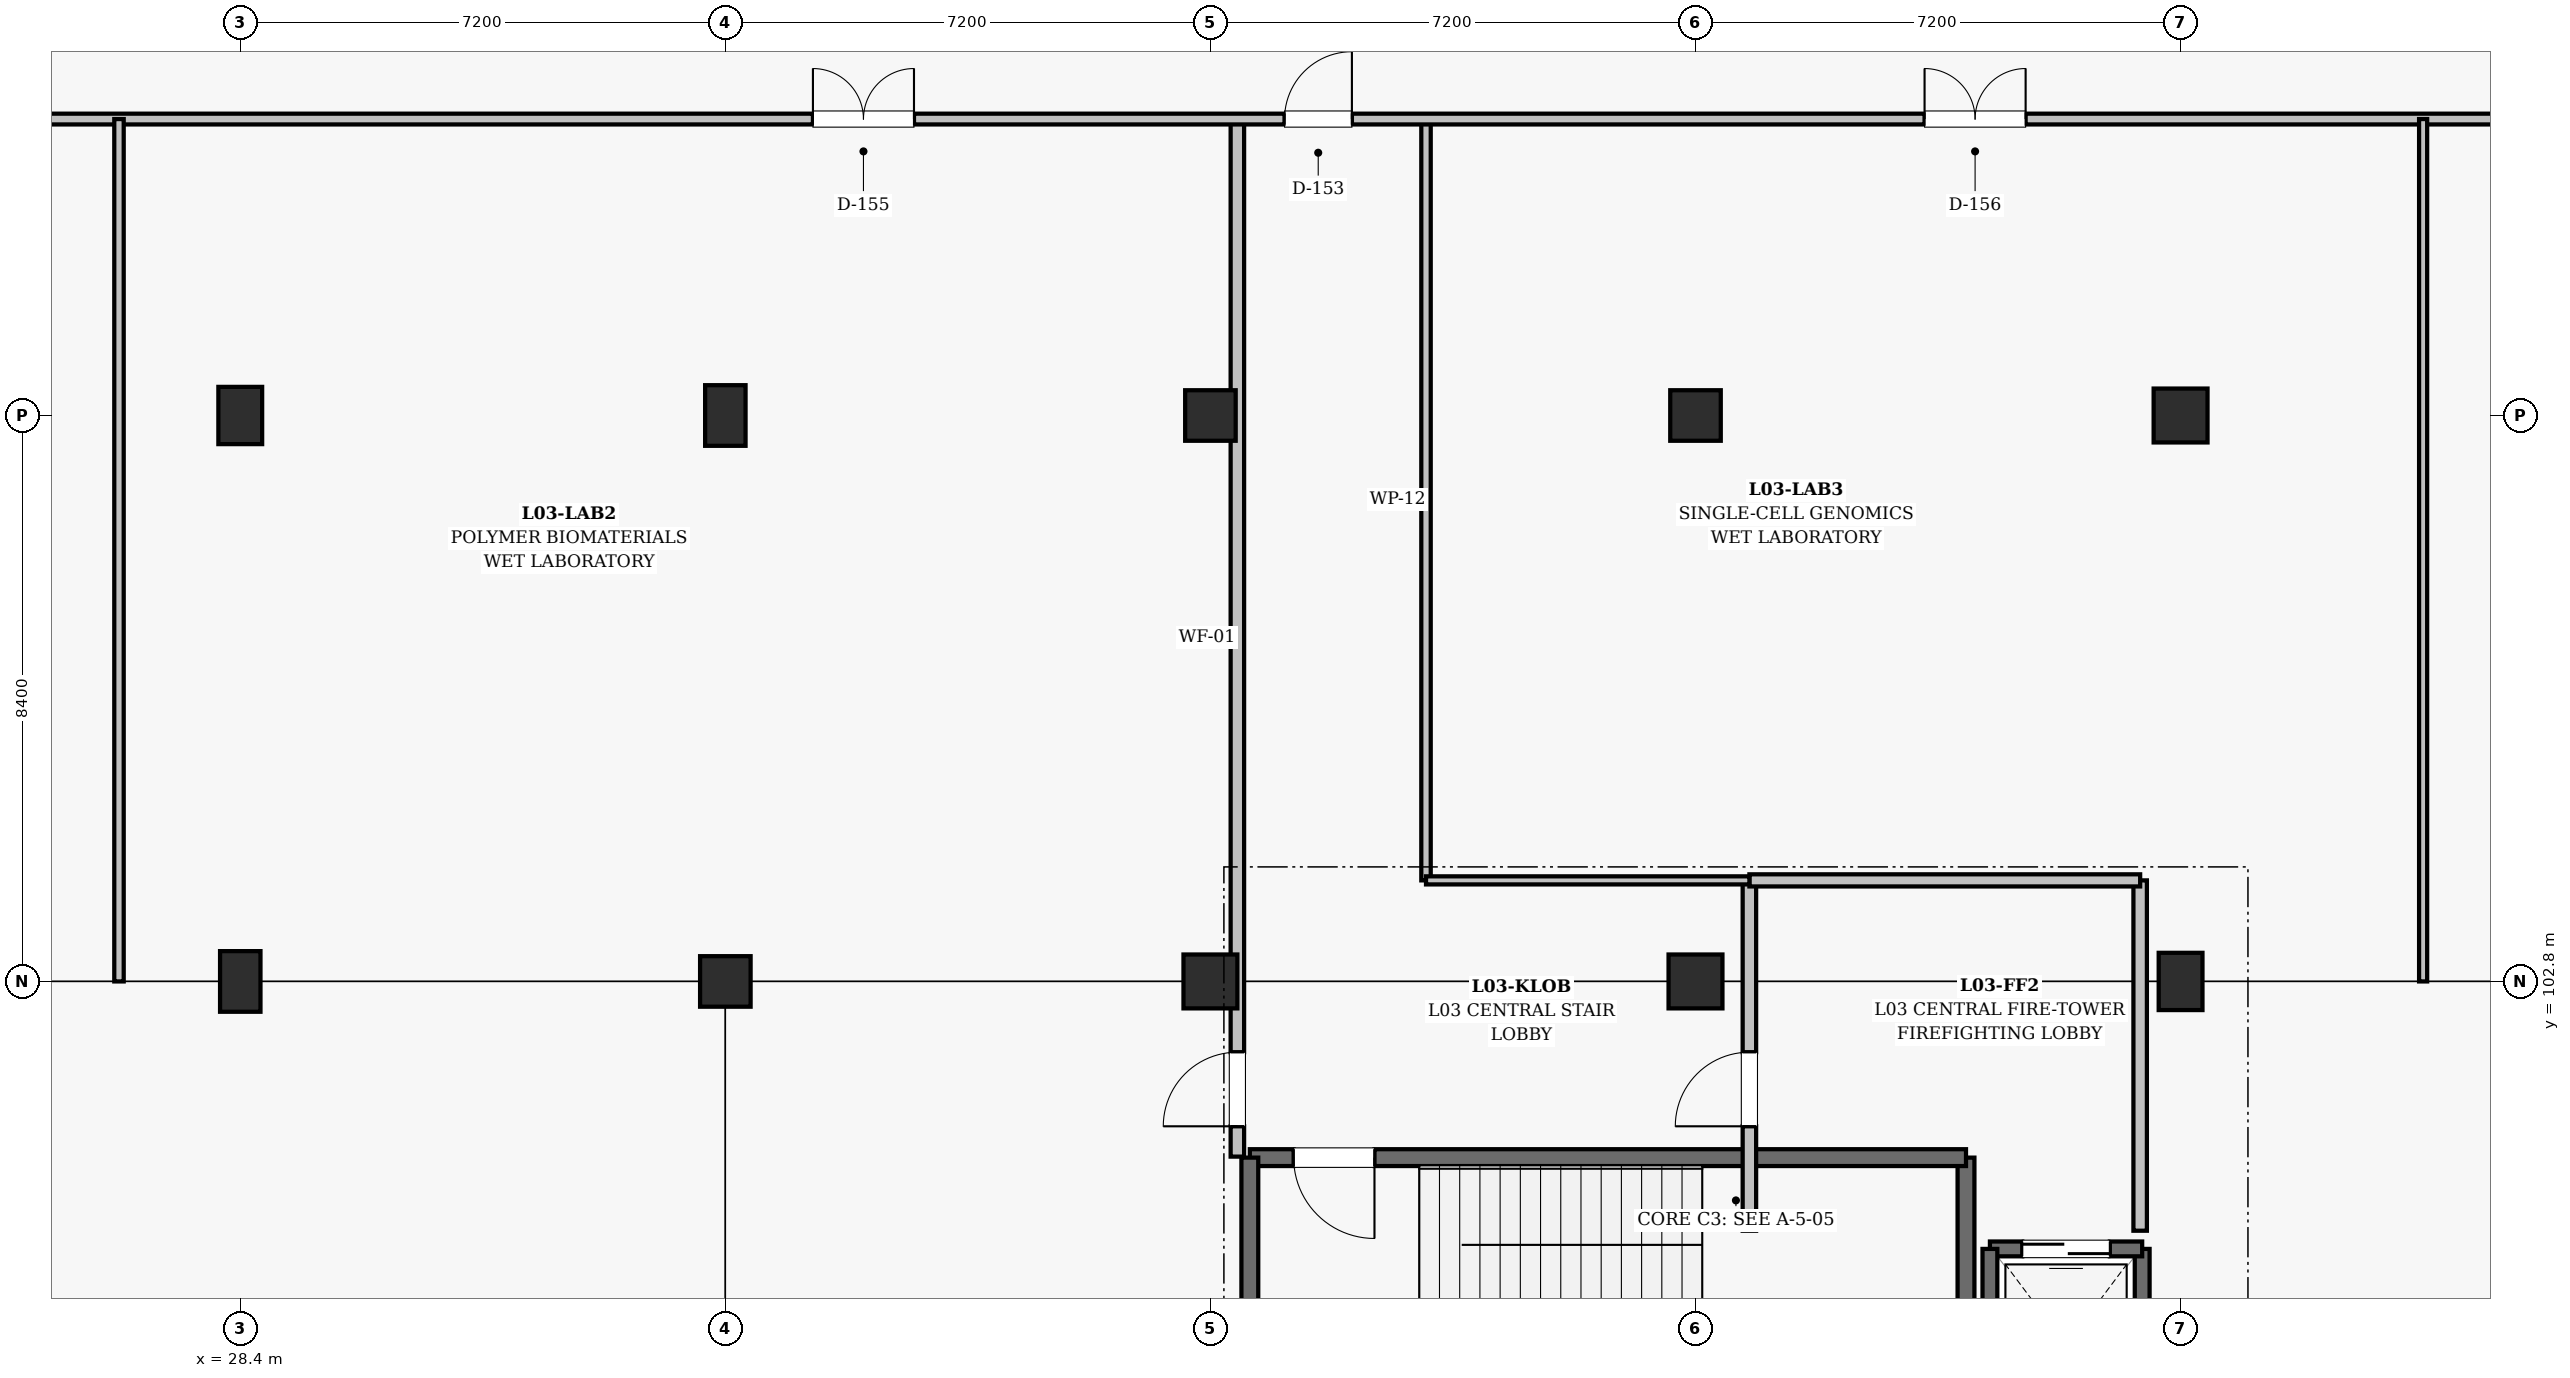
"""IFC4 building model, lengths in metres.
Left out: names, types, materials, properties, quantities, classifications, styles, units other than length and angle.
Written with IfcOpenShell. Run it as: python <this file> out.ifc"""

import sys

from ifc_helpers import new_model, si_unit, direction, frame, frame_2d, origin, origin_2d, place, context, subcontext, project, spatial, rectangle, extrude, element, fill, save


model = new_model("IFC4")
c1 = context("Model", 3, precision=1e-05, world=origin(), true_north=direction((0.0, 1.0)))
c2 = subcontext(c1, "Body", "Model", "MODEL_VIEW")
j1 = project(units=[si_unit("LENGTHUNIT", "METRE"), si_unit("PLANEANGLEUNIT", "RADIAN")], contexts=[c1])
p1 = place(None, origin())
s1 = spatial("IfcSite", under=j1, at=p1, CompositionType="ELEMENT")
p2 = place(p1, origin())
s2 = spatial("IfcBuilding", under=s1, at=p2, CompositionType="ELEMENT")
p3 = place(p2, frame((0.0, 0.0, 14.4)))
s3 = spatial("IfcBuildingStorey", under=s2, at=p3, CompositionType="ELEMENT", Elevation=14.4)
p4 = place(p3, frame((28.4, 102.8, 0.0), z_axis=(0.0, 0.0, 1.0), x_axis=(1.0, 0.0, 0.0)))
e1 = element("IfcColumn", 1, at=p4, inside=s3, PredefinedType="COLUMN", context=c2, shape_type="SweptSolid", body=[
    extrude(rectangle(XDim=0.6, YDim=0.9, at=origin_2d()), origin(), (0.0, 0.0, 1.0), 4.5),
])
p5 = place(p3, frame((28.4, 111.2, 0.0), z_axis=(0.0, 0.0, 1.0), x_axis=(1.0, 0.0, 0.0)))
e2 = element("IfcColumn", 2, at=p5, inside=s3, PredefinedType="COLUMN", context=c2, shape_type="SweptSolid", body=[
    extrude(rectangle(XDim=0.65, YDim=0.85, at=origin_2d()), origin(), (0.0, 0.0, 1.0), 4.5),
])
p6 = place(p3, frame((35.6, 102.8, 0.0), z_axis=(0.0, 0.0, 1.0), x_axis=(1.0, 0.0, 0.0)))
e3 = element("IfcColumn", 3, at=p6, inside=s3, PredefinedType="COLUMN", context=c2, shape_type="SweptSolid", body=[
    extrude(rectangle(XDim=0.75, YDim=0.75, at=origin_2d()), origin(), (0.0, 0.0, 1.0), 4.5),
])
p7 = place(p3, frame((35.6, 111.2, 0.0), z_axis=(0.0, 0.0, 1.0), x_axis=(1.0, 0.0, 0.0)))
e4 = element("IfcColumn", 4, at=p7, inside=s3, PredefinedType="COLUMN", context=c2, shape_type="SweptSolid", body=[
    extrude(rectangle(XDim=0.6, YDim=0.9, at=origin_2d()), origin(), (0.0, 0.0, 1.0), 4.5),
])
p8 = place(p3, frame((42.8, 102.8, 0.0), z_axis=(0.0, 0.0, 1.0), x_axis=(1.0, 0.0, 0.0)))
e5 = element("IfcColumn", 5, at=p8, inside=s3, PredefinedType="COLUMN", context=c2, shape_type="SweptSolid", body=[
    extrude(rectangle(XDim=0.8, YDim=0.8, at=origin_2d()), origin(), (0.0, 0.0, 1.0), 4.5),
])
p9 = place(p3, frame((42.8, 111.2, 0.0), z_axis=(0.0, 0.0, 1.0), x_axis=(1.0, 0.0, 0.0)))
e6 = element("IfcColumn", 6, at=p9, inside=s3, PredefinedType="COLUMN", context=c2, shape_type="SweptSolid", body=[
    extrude(rectangle(XDim=0.75, YDim=0.75, at=origin_2d()), origin(), (0.0, 0.0, 1.0), 4.5),
])
p10 = place(p3, frame((50.0, 102.8, 0.0), z_axis=(0.0, 0.0, 1.0), x_axis=(1.0, 0.0, 0.0)))
e7 = element("IfcColumn", 7, at=p10, inside=s3, PredefinedType="COLUMN", context=c2, shape_type="SweptSolid", body=[
    extrude(rectangle(XDim=0.8, YDim=0.8, at=origin_2d()), origin(), (0.0, 0.0, 1.0), 4.5),
])
p11 = place(p3, frame((50.0, 111.2, 0.0), z_axis=(0.0, 0.0, 1.0), x_axis=(1.0, 0.0, 0.0)))
e8 = element("IfcColumn", 8, at=p11, inside=s3, PredefinedType="COLUMN", context=c2, shape_type="SweptSolid", body=[
    extrude(rectangle(XDim=0.75, YDim=0.75, at=origin_2d()), origin(), (0.0, 0.0, 1.0), 4.5),
])
p12 = place(p3, frame((57.2, 102.8, 0.0), z_axis=(0.0, 0.0, 1.0), x_axis=(1.0, 0.0, 0.0)))
e9 = element("IfcColumn", 9, at=p12, inside=s3, PredefinedType="COLUMN", context=c2, shape_type="SweptSolid", body=[
    extrude(rectangle(XDim=0.65, YDim=0.85, at=origin_2d()), origin(), (0.0, 0.0, 1.0), 4.5),
])
p13 = place(p3, frame((57.2, 111.2, 0.0), z_axis=(0.0, 0.0, 1.0), x_axis=(1.0, 0.0, 0.0)))
e10 = element("IfcColumn", 10, at=p13, inside=s3, PredefinedType="COLUMN", context=c2, shape_type="SweptSolid", body=[
    extrude(rectangle(XDim=0.8, YDim=0.8, at=origin_2d()), origin(), (0.0, 0.0, 1.0), 4.5),
])
p14 = place(p3, frame((54.015, 95.085, 0.0), z_axis=(0.0, 0.0, 1.0), x_axis=(0.0, 1.0, 0.0)))
e11 = element("IfcWall", 11, at=p14, inside=s3, PredefinedType="SHEAR", context=c2, shape_type="SweptSolid", body=[
    extrude(rectangle(XDim=5.1, YDim=0.25, at=frame_2d((2.55, 0.0))), origin(), (0.0, 0.0, 1.0), 4.175),
])
p15 = place(p3, frame((54.015, 100.185, 0.0), z_axis=(0.0, 0.0, 1.0), x_axis=(-1.0, 0.0, 0.0)))
e12 = element("IfcWall", 12, at=p15, inside=s3, PredefinedType="SHEAR", context=c2, shape_type="SweptSolid", body=[
    extrude(rectangle(XDim=10.63, YDim=0.25, at=frame_2d((5.315, 0.0))), origin(), (0.0, 0.0, 1.0), 4.175),
])
p16 = place(p15, frame((8.78, 0.0, 0.0)))
e13 = element("IfcOpeningElement", 13, at=p16, cuts=e12, PredefinedType="OPENING", context=c2, shape_type="SweptSolid", body=[
    extrude(rectangle(XDim=1.2, YDim=2.15, at=frame_2d((0.6, 1.075))), frame((0.0, 0.135, 0.0), z_axis=(0.0, -1.0, 0.0), x_axis=(1.0, 0.0, 0.0)), (0.0, 0.0, 1.0), 0.27),
])
p17 = place(p3, frame((43.385, 100.185, 0.0), z_axis=(0.0, 0.0, 1.0), x_axis=(0.0, -1.0, 0.0)))
e14 = element("IfcWall", 14, at=p17, inside=s3, PredefinedType="SHEAR", context=c2, shape_type="SweptSolid", body=[
    extrude(rectangle(XDim=5.1, YDim=0.25, at=frame_2d((2.55, 0.0))), origin(), (0.0, 0.0, 1.0), 4.175),
])
p18 = place(p3, frame((56.63, 95.97, 0.0), z_axis=(0.0, 0.0, 1.0), x_axis=(0.0, 1.0, 0.0)))
e15 = element("IfcWall", 15, at=p18, inside=s3, PredefinedType="SHEAR", context=c2, shape_type="SweptSolid", body=[
    extrude(rectangle(XDim=2.86, YDim=0.22, at=frame_2d((1.43, 0.0))), origin(), (0.0, 0.0, 1.0), 4.175),
])
p19 = place(p3, frame((56.63, 98.83, 0.0), z_axis=(0.0, 0.0, 1.0), x_axis=(-1.0, 0.0, 0.0)))
e16 = element("IfcWall", 16, at=p19, inside=s3, PredefinedType="SHEAR", context=c2, shape_type="SweptSolid", body=[
    extrude(rectangle(XDim=2.26, YDim=0.22, at=frame_2d((1.13, 0.0))), origin(), (0.0, 0.0, 1.0), 4.175),
])
p20 = place(p19, frame((0.48, 0.0, 0.0)))
e17 = element("IfcOpeningElement", 17, at=p20, cuts=e16, PredefinedType="OPENING", context=c2, shape_type="SweptSolid", body=[
    extrude(rectangle(XDim=1.3, YDim=2.2, at=frame_2d((0.65, 1.1))), frame((0.0, 0.12, 0.0), z_axis=(0.0, -1.0, 0.0), x_axis=(1.0, 0.0, 0.0)), (0.0, 0.0, 1.0), 0.24),
])
p21 = place(p3, frame((54.37, 98.83, 0.0), z_axis=(0.0, 0.0, 1.0), x_axis=(0.0, -1.0, 0.0)))
e18 = element("IfcWall", 18, at=p21, inside=s3, PredefinedType="SHEAR", context=c2, shape_type="SweptSolid", body=[
    extrude(rectangle(XDim=2.86, YDim=0.22, at=frame_2d((1.43, 0.0))), origin(), (0.0, 0.0, 1.0), 4.175),
])
p22 = place(p3, frame((50.8, 99.1, 0.0), z_axis=(0.0, 0.0, 1.0), x_axis=(0.0, 1.0, 0.0)))
e19 = element("IfcWall", 19, at=p22, inside=s3, PredefinedType="SOLIDWALL", context=c2, shape_type="SweptSolid", body=[
    extrude(rectangle(XDim=5.2, YDim=0.2, at=frame_2d((2.6, 0.0))), origin(), (0.0, 0.0, 1.0), 3.36),
])
p23 = place(p22, frame((1.55, 0.0, 0.0)))
e20 = element("IfcOpeningElement", 20, at=p23, cuts=e19, PredefinedType="OPENING", context=c2, shape_type="SweptSolid", body=[
    extrude(rectangle(XDim=1.1, YDim=2.15, at=frame_2d((0.55, 1.075))), frame((0.0, 0.11, 0.0), z_axis=(0.0, -1.0, 0.0), x_axis=(1.0, 0.0, 0.0)), (0.0, 0.0, 1.0), 0.22),
])
p24 = place(p3, frame((56.6, 99.1, 0.0), z_axis=(0.0, 0.0, 1.0), x_axis=(0.0, 1.0, 0.0)))
e21 = element("IfcWall", 21, at=p24, inside=s3, PredefinedType="SOLIDWALL", context=c2, shape_type="SweptSolid", body=[
    extrude(rectangle(XDim=5.2, YDim=0.2, at=frame_2d((2.6, 0.0))), origin(), (0.0, 0.0, 1.0), 3.36),
])
p25 = place(p3, frame((50.8, 104.3, 0.0), z_axis=(0.0, 0.0, 1.0), x_axis=(1.0, 0.0, 0.0)))
e22 = element("IfcWall", 22, at=p25, inside=s3, PredefinedType="SOLIDWALL", context=c2, shape_type="SweptSolid", body=[
    extrude(rectangle(XDim=5.8, YDim=0.18, at=frame_2d((2.9, 0.0))), origin(), (0.0, 0.0, 1.0), 3.56),
])
p26 = place(p3, frame((43.2, 100.2, 0.0), z_axis=(0.0, 0.0, 1.0), x_axis=(0.0, 1.0, 0.0)))
e23 = element("IfcWall", 23, at=p26, inside=s3, PredefinedType="SOLIDWALL", context=c2, shape_type="SweptSolid", body=[
    extrude(rectangle(XDim=15.4, YDim=0.2, at=frame_2d((7.7, 0.0))), origin(), (0.0, 0.0, 1.0), 2.96),
])
p27 = place(p26, frame((0.45, 0.0, 0.0)))
e24 = element("IfcOpeningElement", 24, at=p27, cuts=e23, PredefinedType="OPENING", context=c2, shape_type="SweptSolid", body=[
    extrude(rectangle(XDim=1.1, YDim=2.15, at=frame_2d((0.55, 1.075))), frame((0.0, 0.11, 0.0), z_axis=(0.0, -1.0, 0.0), x_axis=(1.0, 0.0, 0.0)), (0.0, 0.0, 1.0), 0.22),
])
p28 = place(p3, frame((46.0, 104.3, 0.0), z_axis=(0.0, 0.0, 1.0), x_axis=(0.0, 1.0, 0.0)))
e25 = element("IfcWall", 25, at=p28, inside=s3, PredefinedType="PARTITIONING", context=c2, shape_type="SweptSolid", body=[
    extrude(rectangle(XDim=11.3, YDim=0.14, at=frame_2d((5.65, 0.0))), origin(), (0.0, 0.0, 1.0), 3.52),
])
p29 = place(p3, frame((46.0, 104.3, 0.0), z_axis=(0.0, 0.0, 1.0), x_axis=(1.0, 0.0, 0.0)))
e26 = element("IfcWall", 26, at=p29, inside=s3, PredefinedType="PARTITIONING", context=c2, shape_type="SweptSolid", body=[
    extrude(rectangle(XDim=4.8, YDim=0.12, at=frame_2d((2.4, 0.0))), origin(), (0.0, 0.0, 1.0), 3.31),
])
p30 = place(p3, frame((14.0, 115.6, 0.0), z_axis=(0.0, 0.0, 1.0), x_axis=(1.0, 0.0, 0.0)))
e27 = element("IfcWall", 27, at=p30, inside=s3, PredefinedType="PARTITIONING", context=c2, shape_type="SweptSolid", body=[
    extrude(rectangle(XDim=100.8, YDim=0.16, at=frame_2d((50.4, 0.0))), origin(), (0.0, 0.0, 1.0), 2.96),
])
p31 = place(p30, frame((29.9, 0.0, 0.0)))
e28 = element("IfcOpeningElement", 28, at=p31, cuts=e27, PredefinedType="OPENING", context=c2, shape_type="SweptSolid", body=[
    extrude(rectangle(XDim=1.0, YDim=2.15, at=frame_2d((0.5, 1.075))), frame((0.0, 0.09, 0.0), z_axis=(0.0, -1.0, 0.0), x_axis=(1.0, 0.0, 0.0)), (0.0, 0.0, 1.0), 0.18),
])
p32 = place(p30, frame((6.5, 0.0, 0.0)))
e29 = element("IfcOpeningElement", 29, at=p32, cuts=e27, PredefinedType="OPENING", context=c2, shape_type="SweptSolid", body=[
    extrude(rectangle(XDim=1.5, YDim=2.25, at=frame_2d((0.75, 1.125))), frame((0.0, 0.09, 0.0), z_axis=(0.0, -1.0, 0.0), x_axis=(1.0, 0.0, 0.0)), (0.0, 0.0, 1.0), 0.18),
])
p33 = place(p30, frame((22.9, 0.0, 0.0)))
e30 = element("IfcOpeningElement", 30, at=p33, cuts=e27, PredefinedType="OPENING", context=c2, shape_type="SweptSolid", body=[
    extrude(rectangle(XDim=1.5, YDim=2.25, at=frame_2d((0.75, 1.125))), frame((0.0, 0.09, 0.0), z_axis=(0.0, -1.0, 0.0), x_axis=(1.0, 0.0, 0.0)), (0.0, 0.0, 1.0), 0.18),
])
p34 = place(p30, frame((39.4, 0.0, 0.0)))
e31 = element("IfcOpeningElement", 31, at=p34, cuts=e27, PredefinedType="OPENING", context=c2, shape_type="SweptSolid", body=[
    extrude(rectangle(XDim=1.5, YDim=2.25, at=frame_2d((0.75, 1.125))), frame((0.0, 0.09, 0.0), z_axis=(0.0, -1.0, 0.0), x_axis=(1.0, 0.0, 0.0)), (0.0, 0.0, 1.0), 0.18),
])
p35 = place(p30, frame((55.8, 0.0, 0.0)))
e32 = element("IfcOpeningElement", 32, at=p35, cuts=e27, PredefinedType="OPENING", context=c2, shape_type="SweptSolid", body=[
    extrude(rectangle(XDim=1.5, YDim=2.25, at=frame_2d((0.75, 1.125))), frame((0.0, 0.09, 0.0), z_axis=(0.0, -1.0, 0.0), x_axis=(1.0, 0.0, 0.0)), (0.0, 0.0, 1.0), 0.18),
])
p36 = place(p30, frame((74.9, 0.0, 0.0)))
e33 = element("IfcOpeningElement", 33, at=p36, cuts=e27, PredefinedType="OPENING", context=c2, shape_type="SweptSolid", body=[
    extrude(rectangle(XDim=1.5, YDim=2.25, at=frame_2d((0.75, 1.125))), frame((0.0, 0.09, 0.0), z_axis=(0.0, -1.0, 0.0), x_axis=(1.0, 0.0, 0.0)), (0.0, 0.0, 1.0), 0.18),
])
p37 = place(p30, frame((87.9, 0.0, 0.0)))
e34 = element("IfcOpeningElement", 34, at=p37, cuts=e27, PredefinedType="OPENING", context=c2, shape_type="SweptSolid", body=[
    extrude(rectangle(XDim=1.1, YDim=2.15, at=frame_2d((0.55, 1.075))), frame((0.0, 0.09, 0.0), z_axis=(0.0, -1.0, 0.0), x_axis=(1.0, 0.0, 0.0)), (0.0, 0.0, 1.0), 0.18),
])
p38 = place(p30, frame((91.45, 0.0, 0.0)))
e35 = element("IfcOpeningElement", 35, at=p38, cuts=e27, PredefinedType="OPENING", context=c2, shape_type="SweptSolid", body=[
    extrude(rectangle(XDim=1.18, YDim=2.2, at=frame_2d((0.59, 1.1))), frame((0.0, 0.09, 0.0), z_axis=(0.0, -1.0, 0.0), x_axis=(1.0, 0.0, 0.0)), (0.0, 0.0, 1.0), 0.18),
])
p39 = place(p3, frame((26.6, 102.8, 0.0), z_axis=(0.0, 0.0, 1.0), x_axis=(0.0, 1.0, 0.0)))
e36 = element("IfcWall", 36, at=p39, inside=s3, PredefinedType="PARTITIONING", context=c2, shape_type="SweptSolid", body=[
    extrude(rectangle(XDim=12.8, YDim=0.14, at=frame_2d((6.4, 0.0))), origin(), (0.0, 0.0, 1.0), 3.51),
])
p40 = place(p3, frame((60.8, 102.8, 0.0), z_axis=(0.0, 0.0, 1.0), x_axis=(0.0, 1.0, 0.0)))
e37 = element("IfcWall", 37, at=p40, inside=s3, PredefinedType="PARTITIONING", context=c2, shape_type="SweptSolid", body=[
    extrude(rectangle(XDim=12.8, YDim=0.12, at=frame_2d((6.4, 0.0))), origin(), (0.0, 0.0, 1.0), 3.51),
])
p41 = place(p16, origin())
e38 = element("IfcDoor", 38, at=p41, inside=s3, OperationType="SINGLE_SWING_LEFT", PredefinedType="DOOR", context=c2, shape_type="SweptSolid", body=[
    extrude(rectangle(XDim=1.2, YDim=2.15, at=frame_2d((0.6, 1.075))), frame((0.0, 0.025, 0.0), z_axis=(0.0, -1.0, 0.0), x_axis=(1.0, 0.0, 0.0)), (0.0, 0.0, 1.0), 0.05),
])
fill(e13, e38)
p42 = place(p20, origin())
e39 = element("IfcDoor", 39, at=p42, inside=s3, OperationType="DOUBLE_DOOR_SLIDING", PredefinedType="DOOR", context=c2, shape_type="SweptSolid", body=[
    extrude(rectangle(XDim=1.3, YDim=2.2, at=frame_2d((0.65, 1.1))), frame((0.0, 0.025, 0.0), z_axis=(0.0, -1.0, 0.0), x_axis=(1.0, 0.0, 0.0)), (0.0, 0.0, 1.0), 0.05),
])
fill(e17, e39)
p43 = place(p23, origin())
e40 = element("IfcDoor", 40, at=p43, inside=s3, OperationType="SINGLE_SWING_LEFT", PredefinedType="DOOR", context=c2, shape_type="SweptSolid", body=[
    extrude(rectangle(XDim=1.1, YDim=2.15, at=frame_2d((0.55, 1.075))), frame((0.0, 0.025, 0.0), z_axis=(0.0, -1.0, 0.0), x_axis=(1.0, 0.0, 0.0)), (0.0, 0.0, 1.0), 0.05),
])
fill(e20, e40)
p44 = place(p27, origin())
e41 = element("IfcDoor", 41, at=p44, inside=s3, OperationType="SINGLE_SWING_LEFT", PredefinedType="DOOR", context=c2, shape_type="SweptSolid", body=[
    extrude(rectangle(XDim=1.1, YDim=2.15, at=frame_2d((0.55, 1.075))), frame((0.0, 0.025, 0.0), z_axis=(0.0, -1.0, 0.0), x_axis=(1.0, 0.0, 0.0)), (0.0, 0.0, 1.0), 0.05),
])
fill(e24, e41)
p45 = place(p31, origin())
e42 = element("IfcDoor", 42, at=p45, inside=s3, OperationType="SINGLE_SWING_RIGHT", PredefinedType="DOOR", context=c2, shape_type="SweptSolid", body=[
    extrude(rectangle(XDim=1.0, YDim=2.15, at=frame_2d((0.5, 1.075))), frame((0.0, 0.025, 0.0), z_axis=(0.0, -1.0, 0.0), x_axis=(1.0, 0.0, 0.0)), (0.0, 0.0, 1.0), 0.05),
])
fill(e28, e42)
p46 = place(p33, origin())
e43 = element("IfcDoor", 43, at=p46, inside=s3, OperationType="DOUBLE_DOOR_SINGLE_SWING", PredefinedType="DOOR", context=c2, shape_type="SweptSolid", body=[
    extrude(rectangle(XDim=1.5, YDim=2.25, at=frame_2d((0.75, 1.125))), frame((0.0, 0.025, 0.0), z_axis=(0.0, -1.0, 0.0), x_axis=(1.0, 0.0, 0.0)), (0.0, 0.0, 1.0), 0.05),
])
fill(e30, e43)
p47 = place(p34, origin())
e44 = element("IfcDoor", 44, at=p47, inside=s3, OperationType="DOUBLE_DOOR_SINGLE_SWING", PredefinedType="DOOR", context=c2, shape_type="SweptSolid", body=[
    extrude(rectangle(XDim=1.5, YDim=2.25, at=frame_2d((0.75, 1.125))), frame((0.0, 0.025, 0.0), z_axis=(0.0, -1.0, 0.0), x_axis=(1.0, 0.0, 0.0)), (0.0, 0.0, 1.0), 0.05),
])
fill(e31, e44)
save(model, sys.argv[1])
